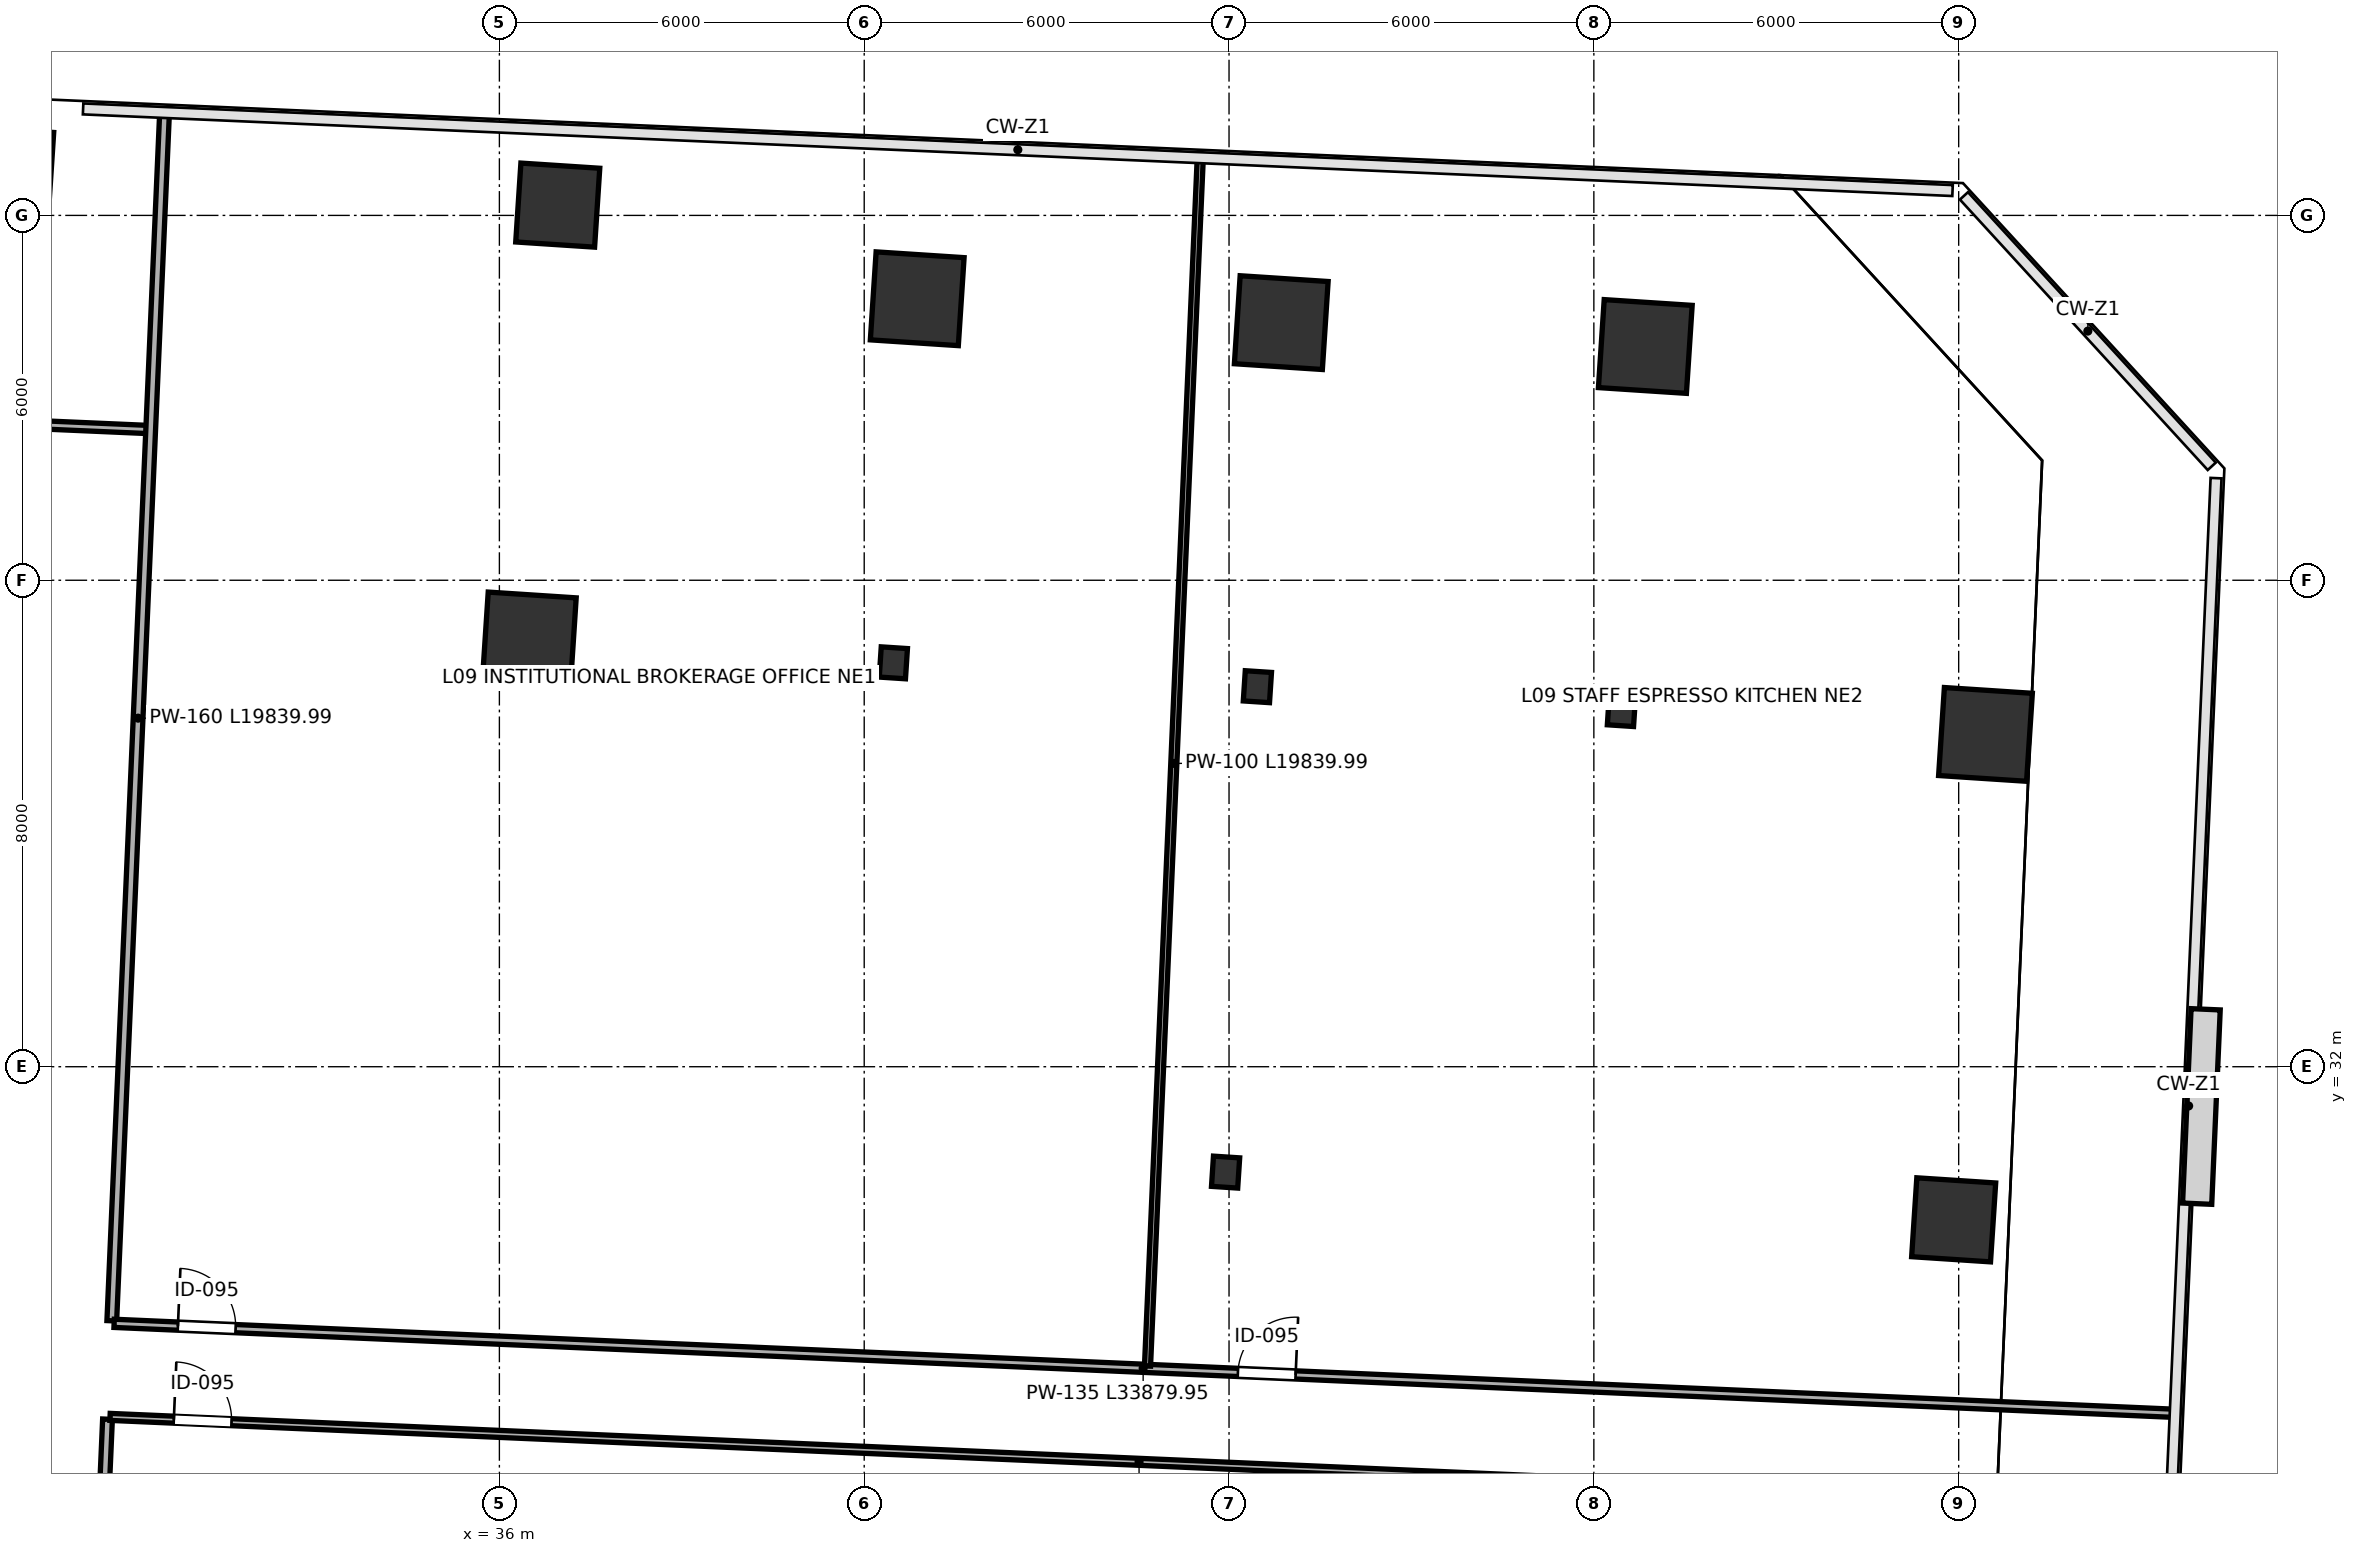
"""IFC4 building model, lengths in metres.
Left out: names, types, materials, properties, quantities, classifications, styles, units other than length and angle.
Written with IfcOpenShell. Run it as: python <this file> out.ifc"""

import sys

from ifc_helpers import new_model, si_unit, direction, frame, frame_2d, origin, origin_2d, place, context, subcontext, project, spatial, rectangle, i_section, extrude, clip, halfspace, source, transform, mapped, element, fill, save


model = new_model("IFC4")
c1 = context("Model", 3, precision=1e-05, world=origin(), true_north=direction((0.0, 1.0)))
c2 = subcontext(c1, "Body", "Model", "MODEL_VIEW")
j1 = project(units=[si_unit("LENGTHUNIT", "METRE"), si_unit("PLANEANGLEUNIT", "RADIAN")], contexts=[c1])
p1 = place(None, origin())
s1 = spatial("IfcSite", under=j1, at=p1, CompositionType="ELEMENT")
p2 = place(p1, origin())
s2 = spatial("IfcBuilding", under=s1, at=p2, CompositionType="ELEMENT")
p3 = place(p2, frame((0.0, 0.0, 42.4)))
s3 = spatial("IfcBuildingStorey", under=s2, at=p3, CompositionType="ELEMENT", Elevation=42.4)
p4 = place(p3, frame((27.979, 46.758, 0.0), z_axis=(0.066603379117, -0.030080581734, 0.997325999106), x_axis=(-0.470170594703, -0.882562613084, 0.004779734565)))
e1 = element("IfcColumn", 1, at=p4, inside=s3, PredefinedType="COLUMN", context=c2, shape_type="Clipping", body=[
    clip(clip(extrude(rectangle(XDim=1.3, YDim=1.3, at=origin_2d()), origin(), (0.0, 0.0, 1.0), 4.813), halfspace(frame((0.0, 0.0, 0.051), z_axis=(0.0, 0.0, -1.0), x_axis=(1.0, 0.0, 0.0)), False)), halfspace(frame((0.0, 0.0, 4.762), z_axis=(0.0, 0.0, 1.0), x_axis=(1.0, 0.0, 0.0)), False)),
])
p5 = place(p3, frame((36.492, 39.034, 0.0), z_axis=(0.031141299161, -0.068267408258, 0.997180916613), x_axis=(-0.934929520198, -0.354799532987, 0.004907509994)))
e2 = element("IfcColumn", 2, at=p5, inside=s3, PredefinedType="COLUMN", context=c2, shape_type="Clipping", body=[
    clip(clip(extrude(rectangle(XDim=1.45, YDim=1.45, at=origin_2d()), origin(), (0.0, 0.0, 1.0), 4.814), halfspace(frame((0.0, 0.0, 0.059), z_axis=(0.0, 0.0, -1.0), x_axis=(1.0, 0.0, 0.0)), False)), halfspace(frame((0.0, 0.0, 4.755), z_axis=(0.0, 0.0, 1.0), x_axis=(1.0, 0.0, 0.0)), False)),
])
p6 = place(p3, frame((36.96, 46.169, 0.0), z_axis=(0.063341492277, -0.070632599301, 0.995489272304), x_axis=(-0.786361684004, -0.617735217601, 0.006205067806)))
e3 = element("IfcColumn", 3, at=p6, inside=s3, PredefinedType="COLUMN", context=c2, shape_type="Clipping", body=[
    clip(clip(extrude(rectangle(XDim=1.3, YDim=1.3, at=origin_2d()), origin(), (0.0, 0.0, 1.0), 4.822), halfspace(frame((0.0, 0.0, 0.067), z_axis=(0.0, 0.0, -1.0), x_axis=(1.0, 0.0, 0.0)), False)), halfspace(frame((0.0, 0.0, 4.755), z_axis=(0.0, 0.0, 1.0), x_axis=(1.0, 0.0, 0.0)), False)),
])
p7 = place(p3, frame((42.479, 38.642, 0.0), z_axis=(0.02899931962, -0.09519671938, 0.99503599135), x_axis=(-0.973515942336, -0.228526470327, 0.006508638639)))
e4 = element("IfcColumn", 4, at=p7, inside=s3, PredefinedType="COLUMN", context=c2, shape_type="Clipping", body=[
    clip(clip(extrude(i_section(OverallWidth=0.432, OverallDepth=0.498, WebThickness=0.056, FlangeThickness=0.089, FilletRadius=0.015, at=origin_2d()), origin(), (0.0, 0.0, 1.0), 4.824), halfspace(frame((0.0, 0.0, 0.027), z_axis=(0.0, 0.0, -1.0), x_axis=(1.0, 0.0, 0.0)), False)), halfspace(frame((0.0, 0.0, 4.797), z_axis=(0.0, 0.0, 1.0), x_axis=(1.0, 0.0, 0.0)), False)),
])
p8 = place(p3, frame((42.872, 44.629, 0.0), z_axis=(0.05594918628, -0.097190862888, 0.993691916403), x_axis=(-0.897226285836, -0.441510130901, 0.007334597258)))
e5 = element("IfcColumn", 5, at=p8, inside=s3, PredefinedType="COLUMN", context=c2, shape_type="Clipping", body=[
    clip(clip(extrude(rectangle(XDim=1.45, YDim=1.45, at=origin_2d()), origin(), (0.0, 0.0, 1.0), 4.831), halfspace(frame((0.0, 0.0, 0.088), z_axis=(0.0, 0.0, -1.0), x_axis=(1.0, 0.0, 0.0)), False)), halfspace(frame((0.0, 0.0, 4.743), z_axis=(0.0, 0.0, 1.0), x_axis=(1.0, 0.0, 0.0)), False)),
])
p9 = place(p3, frame((47.943, 30.267, 0.0), z_axis=(-0.009139992068, -0.119223874428, 0.992825326184), x_axis=(-0.989976087414, 0.141018389622, 0.007820494689)))
e6 = element("IfcColumn", 6, at=p9, inside=s3, PredefinedType="COLUMN", context=c2, shape_type="Clipping", body=[
    clip(clip(extrude(i_section(OverallWidth=0.432, OverallDepth=0.498, WebThickness=0.056, FlangeThickness=0.089, FilletRadius=0.015, at=origin_2d()), origin(), (0.0, 0.0, 1.0), 4.835), halfspace(frame((0.0, 0.0, 0.032), z_axis=(0.0, 0.0, -1.0), x_axis=(1.0, 0.0, 0.0)), False)), halfspace(frame((0.0, 0.0, 4.802), z_axis=(0.0, 0.0, 1.0), x_axis=(1.0, 0.0, 0.0)), False)),
])
p10 = place(p3, frame((48.467, 38.25, 0.0), z_axis=(0.026846953188, -0.121921501695, 0.992176591403), x_axis=(-0.988467452894, -0.151213180759, 0.008165080119)))
e7 = element("IfcColumn", 7, at=p10, inside=s3, PredefinedType="COLUMN", context=c2, shape_type="Clipping", body=[
    clip(clip(extrude(i_section(OverallWidth=0.432, OverallDepth=0.498, WebThickness=0.056, FlangeThickness=0.089, FilletRadius=0.015, at=origin_2d()), origin(), (0.0, 0.0, 1.0), 4.838), halfspace(frame((0.0, 0.0, 0.034), z_axis=(0.0, 0.0, -1.0), x_axis=(1.0, 0.0, 0.0)), False)), halfspace(frame((0.0, 0.0, 4.804), z_axis=(0.0, 0.0, 1.0), x_axis=(1.0, 0.0, 0.0)), False)),
])
p11 = place(p3, frame((48.859, 44.237, 0.0), z_axis=(0.053773429187, -0.123774641127, 0.990852287946), x_axis=(-0.941041633397, -0.338175608551, 0.008826210683)))
e8 = element("IfcColumn", 8, at=p11, inside=s3, PredefinedType="COLUMN", context=c2, shape_type="Clipping", body=[
    clip(clip(extrude(rectangle(XDim=1.45, YDim=1.45, at=origin_2d()), origin(), (0.0, 0.0, 1.0), 4.844), halfspace(frame((0.0, 0.0, 0.106), z_axis=(0.0, 0.0, -1.0), x_axis=(1.0, 0.0, 0.0)), False)), halfspace(frame((0.0, 0.0, 4.739), z_axis=(0.0, 0.0, 1.0), x_axis=(1.0, 0.0, 0.0)), False)),
])
p12 = place(p3, frame((54.454, 37.857, 0.0), z_axis=(0.02468913252, -0.148386211946, 0.988621251461), x_axis=(-0.994939353352, -0.099994450958, 0.009838339745)))
e9 = element("IfcColumn", 9, at=p12, inside=s3, PredefinedType="COLUMN", context=c2, shape_type="Clipping", body=[
    clip(clip(extrude(i_section(OverallWidth=0.432, OverallDepth=0.498, WebThickness=0.056, FlangeThickness=0.089, FilletRadius=0.015, at=origin_2d()), origin(), (0.0, 0.0, 1.0), 4.855), halfspace(frame((0.0, 0.0, 0.041), z_axis=(0.0, 0.0, -1.0), x_axis=(1.0, 0.0, 0.0)), False)), halfspace(frame((0.0, 0.0, 4.814), z_axis=(0.0, 0.0, 1.0), x_axis=(1.0, 0.0, 0.0)), False)),
])
p13 = place(p3, frame((54.846, 43.844, 0.0), z_axis=(0.051472350081, -0.150198828384, 0.987314999951), x_axis=(-0.964901499292, -0.262406674898, 0.01038429745)))
e10 = element("IfcColumn", 10, at=p13, inside=s3, PredefinedType="COLUMN", context=c2, shape_type="Clipping", body=[
    clip(clip(extrude(rectangle(XDim=1.45, YDim=1.45, at=origin_2d()), origin(), (0.0, 0.0, 1.0), 4.862), halfspace(frame((0.0, 0.0, 0.125), z_axis=(0.0, 0.0, -1.0), x_axis=(1.0, 0.0, 0.0)), False)), halfspace(frame((0.0, 0.0, 4.737), z_axis=(0.0, 0.0, 1.0), x_axis=(1.0, 0.0, 0.0)), False)),
])
p14 = place(p3, frame((59.917, 29.482, 0.0), z_axis=(-0.013126468892, -0.171846520223, 0.985036278165), x_axis=(-0.990053766885, 0.140237226743, 0.011272041138)))
e11 = element("IfcColumn", 11, at=p14, inside=s3, PredefinedType="COLUMN", context=c2, shape_type="Clipping", body=[
    clip(clip(extrude(rectangle(XDim=1.3, YDim=1.3, at=origin_2d()), origin(), (0.0, 0.0, 1.0), 4.873), halfspace(frame((0.0, 0.0, 0.122), z_axis=(0.0, 0.0, -1.0), x_axis=(1.0, 0.0, 0.0)), False)), halfspace(frame((0.0, 0.0, 4.751), z_axis=(0.0, 0.0, 1.0), x_axis=(1.0, 0.0, 0.0)), False)),
])
p15 = place(p3, frame((60.441, 37.465, 0.0), z_axis=(0.022530926729, -0.174489510333, 0.984401223143), x_axis=(-0.997887745701, -0.063934639332, 0.011506905422)))
e12 = element("IfcColumn", 12, at=p15, inside=s3, PredefinedType="COLUMN", context=c2, shape_type="Clipping", body=[
    clip(clip(extrude(rectangle(XDim=1.45, YDim=1.45, at=origin_2d()), origin(), (0.0, 0.0, 1.0), 4.876), halfspace(frame((0.0, 0.0, 0.138), z_axis=(0.0, 0.0, -1.0), x_axis=(1.0, 0.0, 0.0)), False)), halfspace(frame((0.0, 0.0, 4.738), z_axis=(0.0, 0.0, 1.0), x_axis=(1.0, 0.0, 0.0)), False)),
])
p16 = place(p3, frame((4.47, 43.604, 0.0), z_axis=(0.0, 0.0, 1.0), x_axis=(0.999047795436, -0.04362914662, 0.0)))
e13 = element("IfcWall", 13, at=p16, inside=s3, PredefinedType="PARTITIONING", context=c2, shape_type="SweptSolid", body=[
    extrude(rectangle(XDim=25.78, YDim=0.135, at=frame_2d((12.89, 0.0))), origin(), (0.0, 0.0, 1.0), 4.56),
])
p17 = place(p16, frame((0.91, 0.0, 0.0)))
e14 = element("IfcOpeningElement", 14, at=p17, cuts=e13, PredefinedType="OPENING", context=c2, shape_type="SweptSolid", body=[
    extrude(rectangle(XDim=0.95, YDim=2.15, at=frame_2d((0.475, 1.075))), frame((0.0, 0.078, 0.0), z_axis=(0.0, -1.0, 0.0), x_axis=(1.0, 0.0, 0.0)), (0.0, 0.0, 1.0), 0.155),
])
p18 = place(p3, frame((29.625, 27.822, 0.0), z_axis=(0.0, 0.0, 1.0), x_axis=(0.043623060059, 0.999048061222, 0.0)))
e15 = element("IfcWall", 15, at=p18, inside=s3, PredefinedType="PARTITIONING", context=c2, shape_type="SweptSolid", body=[
    extrude(rectangle(XDim=19.84, YDim=0.16, at=frame_2d((9.92, 0.0))), origin(), (0.0, 0.0, 1.0), 3.695),
])
p19 = place(p3, frame((29.006, 13.635, 0.0), z_axis=(0.0, 0.0, 1.0), x_axis=(0.043626715414, 0.999047901605, 0.0)))
e16 = element("IfcWall", 16, at=p19, inside=s3, PredefinedType="PARTITIONING", context=c2, shape_type="SweptSolid", body=[
    extrude(rectangle(XDim=12.58, YDim=0.16, at=frame_2d((6.29, 0.0))), origin(), (0.0, 0.0, 1.0), 4.56),
])
p20 = place(p3, frame((29.664, 27.78, 0.0), z_axis=(0.0, 0.0, 1.0), x_axis=(0.999048269666, -0.043618286038, 0.0)))
e17 = element("IfcWall", 17, at=p20, inside=s3, PredefinedType="PARTITIONING", context=c2, shape_type="SweptSolid", body=[
    extrude(rectangle(XDim=33.88, YDim=0.135, at=frame_2d((16.94, 0.0))), origin(), (0.0, 0.0, 1.0), 3.695),
])
p21 = place(p20, frame((1.05, 0.0, 0.0)))
e18 = element("IfcOpeningElement", 18, at=p21, cuts=e17, PredefinedType="OPENING", context=c2, shape_type="SweptSolid", body=[
    extrude(rectangle(XDim=0.95, YDim=2.15, at=frame_2d((0.475, 1.075))), frame((0.0, 0.078, 0.0), z_axis=(0.0, -1.0, 0.0), x_axis=(1.0, 0.0, 0.0)), (0.0, 0.0, 1.0), 0.155),
])
p22 = place(p20, frame((18.5, 0.0, 0.0)))
e19 = element("IfcOpeningElement", 19, at=p22, cuts=e17, PredefinedType="OPENING", context=c2, shape_type="SweptSolid", body=[
    extrude(rectangle(XDim=0.95, YDim=2.15, at=frame_2d((0.475, 1.075))), frame((0.0, 0.078, 0.0), z_axis=(0.0, -1.0, 0.0), x_axis=(1.0, 0.0, 0.0)), (0.0, 0.0, 1.0), 0.155),
])
p23 = place(p3, frame((29.597, 26.241, 0.0), z_axis=(0.0, 0.0, 1.0), x_axis=(0.999047941909, -0.043625792456, 0.0)))
e20 = element("IfcWall", 20, at=p23, inside=s3, PredefinedType="PARTITIONING", context=c2, shape_type="SweptSolid", body=[
    extrude(rectangle(XDim=33.88, YDim=0.115, at=frame_2d((16.94, 0.0))), origin(), (0.0, 0.0, 1.0), 3.695),
])
p24 = place(p23, frame((1.05, 0.0, 0.0)))
e21 = element("IfcOpeningElement", 21, at=p24, cuts=e20, PredefinedType="OPENING", context=c2, shape_type="SweptSolid", body=[
    extrude(rectangle(XDim=0.95, YDim=2.15, at=frame_2d((0.475, 1.075))), frame((0.0, 0.067, 0.0), z_axis=(0.0, -1.0, 0.0), x_axis=(1.0, 0.0, 0.0)), (0.0, 0.0, 1.0), 0.135),
])
p25 = place(p3, frame((46.659, 27.078, 0.0), z_axis=(0.0, 0.0, 1.0), x_axis=(0.043623060059, 0.999048061222, 0.0)))
e22 = element("IfcWall", 22, at=p25, inside=s3, PredefinedType="PARTITIONING", context=c2, shape_type="SweptSolid", body=[
    extrude(rectangle(XDim=19.84, YDim=0.1, at=frame_2d((9.92, 0.0))), origin(), (0.0, 0.0, 1.0), 3.923),
])
m1 = source(origin(), c2, "Body", "SweptSolid", [
    extrude(rectangle(XDim=0.95, YDim=2.15, at=frame_2d((0.475, 1.075))), frame((0.0, 0.025, 0.0), z_axis=(0.0, -1.0, 0.0), x_axis=(1.0, 0.0, 0.0)), (0.0, 0.0, 1.0), 0.05),
])
p26 = place(p21, origin())
e23 = element("IfcDoor", 23, at=p26, inside=s3, OperationType="SINGLE_SWING_LEFT", PredefinedType="DOOR", context=c2, shape_type="MappedRepresentation", body=[
    mapped(m1, transform((0.0, 0.0, 0.0), scale=1.0)),
])
fill(e18, e23)
p27 = place(p22, origin())
e24 = element("IfcDoor", 24, at=p27, inside=s3, OperationType="SINGLE_SWING_RIGHT", PredefinedType="DOOR", context=c2, shape_type="MappedRepresentation", body=[
    mapped(m1, transform((0.0, 0.0, 0.0), scale=1.0)),
])
fill(e19, e24)
p28 = place(p24, origin())
e25 = element("IfcDoor", 25, at=p28, inside=s3, OperationType="SINGLE_SWING_LEFT", PredefinedType="DOOR", context=c2, shape_type="MappedRepresentation", body=[
    mapped(m1, transform((0.0, 0.0, 0.0), scale=1.0)),
])
fill(e21, e25)
save(model, sys.argv[1])
